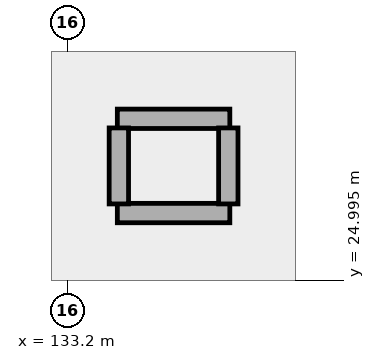
"""IFC4 building model, lengths in metres.
Left out: names, types, materials, properties, quantities, classifications, styles, units other than length and angle.
Written with IfcOpenShell. Run it as: python <this file> out.ifc"""

import sys

from ifc_helpers import new_model, si_unit, direction, frame, frame_2d, origin, place, context, subcontext, project, spatial, rectangle, extrude, element, save


model = new_model("IFC4")
c1 = context("Model", 3, precision=1e-05, world=origin(), true_north=direction((0.0, 1.0)))
c2 = subcontext(c1, "Body", "Model", "MODEL_VIEW")
j1 = project(units=[si_unit("LENGTHUNIT", "METRE"), si_unit("PLANEANGLEUNIT", "RADIAN")], contexts=[c1])
p1 = place(None, origin())
s1 = spatial("IfcSite", under=j1, at=p1, CompositionType="ELEMENT")
p2 = place(p1, origin())
s2 = spatial("IfcBuilding", under=s1, at=p2, CompositionType="ELEMENT")
p3 = place(p2, frame((0.0, 0.0, 20.7)))
s3 = spatial("IfcBuildingStorey", under=s2, at=p3, CompositionType="ELEMENT", Elevation=20.7)
for number, where, z_axis, x_axis in (
    (1, (133.86, 27.12, 0.0), (0.0, 0.0, 1.0), (1.0, 0.0, 0.0)),
    (2, (133.86, 25.88, 0.0), (0.0, 0.0, 1.0), (1.0, 0.0, 0.0)),
):
    element("IfcWall", number, at=place(p3, frame(where, z_axis=z_axis, x_axis=x_axis)), inside=s3, PredefinedType="PARTITIONING", context=c2, shape_type="SweptSolid", body=[
        extrude(rectangle(XDim=1.48, YDim=0.255, at=frame_2d((0.74, 0.0))), origin(), (0.0, 0.0, 1.0), 4.98),
    ])
for number, where, z_axis, x_axis in (
    (3, (133.88, 26.0, 0.0), (0.0, 0.0, 1.0), (0.0, 1.0, 0.0)),
    (4, (135.32, 26.0, 0.0), (0.0, 0.0, 1.0), (0.0, 1.0, 0.0)),
):
    element("IfcWall", number, at=place(p3, frame(where, z_axis=z_axis, x_axis=x_axis)), inside=s3, PredefinedType="PARTITIONING", context=c2, shape_type="SweptSolid", body=[
        extrude(rectangle(XDim=1.0, YDim=0.255, at=frame_2d((0.5, 0.0))), origin(), (0.0, 0.0, 1.0), 4.98),
    ])
save(model, sys.argv[1])
